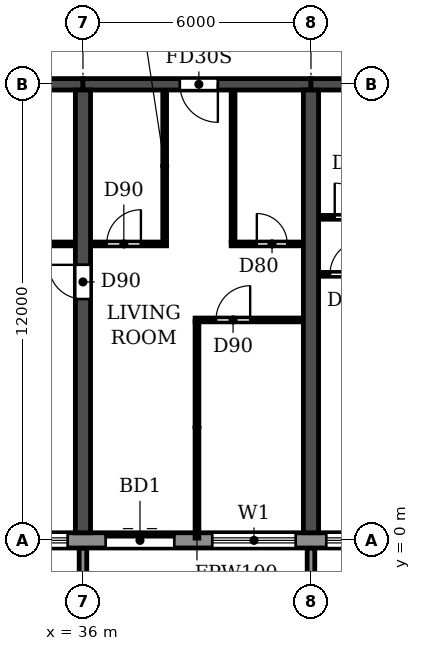
"""IFC4 building model, lengths in metres.
Left out: names, types, materials, properties, quantities, classifications, styles, units other than length and angle.
Written with IfcOpenShell. Run it as: python <this file> out.ifc"""

import sys

from ifc_helpers import new_model, si_unit, direction, frame, frame_2d, origin, place, context, subcontext, project, spatial, polyline, rectangle, outline, extrude, source, transform, mapped, element, fill, save


model = new_model("IFC4")
c1 = context("Model", 3, precision=1e-05, world=origin(), true_north=direction((0.0, 1.0)))
c2 = subcontext(c1, "Body", "Model", "MODEL_VIEW")
j1 = project(units=[si_unit("LENGTHUNIT", "METRE"), si_unit("PLANEANGLEUNIT", "RADIAN")], contexts=[c1])
p1 = place(None, origin())
s1 = spatial("IfcSite", under=j1, at=p1, CompositionType="ELEMENT")
p2 = place(p1, origin())
s2 = spatial("IfcBuilding", under=s1, at=p2, CompositionType="ELEMENT")
p3 = place(p2, frame((0.0, 0.0, 63.0)))
s3 = spatial("IfcBuildingStorey", under=s2, at=p3, CompositionType="ELEMENT", Elevation=63.0)
p4 = place(p3, frame((36.0, 0.2, 0.0), z_axis=(0.0, 0.0, 1.0), x_axis=(0.0, 1.0, 0.0)))
e1 = element("IfcWall", 1, at=p4, inside=s3, PredefinedType="SHEAR", context=c2, shape_type="SweptSolid", body=[
    extrude(rectangle(XDim=11.65, YDim=0.4, at=frame_2d((5.825, 0.0))), origin(), (0.0, 0.0, 1.0), 2.95),
])
p5 = place(p4, frame((6.15, 0.0, 0.0)))
e2 = element("IfcOpeningElement", 2, at=p5, cuts=e1, PredefinedType="OPENING", context=c2, shape_type="SweptSolid", body=[
    extrude(rectangle(XDim=0.9, YDim=2.1, at=frame_2d((0.45, 1.05))), frame((0.0, 0.21, 0.0), z_axis=(0.0, -1.0, 0.0), x_axis=(1.0, 0.0, 0.0)), (0.0, 0.0, 1.0), 0.42),
])
p6 = place(p3, frame((42.0, 0.2, 0.0), z_axis=(0.0, 0.0, 1.0), x_axis=(0.0, 1.0, 0.0)))
e3 = element("IfcWall", 3, at=p6, inside=s3, PredefinedType="SHEAR", context=c2, shape_type="SweptSolid", body=[
    extrude(rectangle(XDim=11.65, YDim=0.4, at=frame_2d((5.825, 0.0))), origin(), (0.0, 0.0, 1.0), 2.95),
])
p7 = place(p3, frame((30.0, 12.0, 0.0), z_axis=(0.0, 0.0, 1.0), x_axis=(1.0, 0.0, 0.0)))
e4 = element("IfcWall", 4, at=p7, inside=s3, PredefinedType="SHEAR", context=c2, shape_type="SweptSolid", body=[
    extrude(rectangle(XDim=6.0, YDim=0.3, at=frame_2d((3.0, 0.0))), origin(), (0.0, 0.0, 1.0), 2.35),
])
p8 = place(p3, frame((36.0, 12.0, 0.0), z_axis=(0.0, 0.0, 1.0), x_axis=(1.0, 0.0, 0.0)))
e5 = element("IfcWall", 5, at=p8, inside=s3, PredefinedType="SHEAR", context=c2, shape_type="SweptSolid", body=[
    extrude(rectangle(XDim=6.0, YDim=0.3, at=frame_2d((3.0, 0.0))), origin(), (0.0, 0.0, 1.0), 2.35),
])
p9 = place(p8, frame((2.55, 0.0, 0.0)))
e6 = element("IfcOpeningElement", 6, at=p9, cuts=e5, PredefinedType="OPENING", context=c2, shape_type="SweptSolid", body=[
    extrude(rectangle(XDim=1.0, YDim=2.1, at=frame_2d((0.5, 1.05))), frame((0.0, 0.16, 0.0), z_axis=(0.0, -1.0, 0.0), x_axis=(1.0, 0.0, 0.0)), (0.0, 0.0, 1.0), 0.32),
])
p10 = place(p3, frame((42.0, 12.0, 0.0), z_axis=(0.0, 0.0, 1.0), x_axis=(1.0, 0.0, 0.0)))
e7 = element("IfcWall", 7, at=p10, inside=s3, PredefinedType="SHEAR", context=c2, shape_type="SweptSolid", body=[
    extrude(rectangle(XDim=6.0, YDim=0.3, at=frame_2d((3.0, 0.0))), origin(), (0.0, 0.0, 1.0), 2.35),
])
p11 = place(p10, frame((2.55, 0.0, 0.0)))
e8 = element("IfcOpeningElement", 8, at=p11, cuts=e7, PredefinedType="OPENING", context=c2, shape_type="SweptSolid", body=[
    extrude(rectangle(XDim=1.0, YDim=2.1, at=frame_2d((0.5, 1.05))), frame((0.0, 0.16, 0.0), z_axis=(0.0, -1.0, 0.0), x_axis=(1.0, 0.0, 0.0)), (0.0, 0.0, 1.0), 0.32),
])
p12 = place(p3, frame((10.683, 0.0, 0.0), z_axis=(0.0, 0.0, 1.0), x_axis=(1.0, 0.0, 0.0)))
e9 = element("IfcWall", 9, at=p12, inside=s3, PredefinedType="STANDARD", context=c2, shape_type="SweptSolid", body=[
    extrude(rectangle(XDim=80.634, YDim=0.4, at=frame_2d((40.317, 0.0))), origin(), (0.0, 0.0, 1.0), 2.95),
])
p13 = place(p12, frame((1.717, 0.0, 0.9)))
e10 = element("IfcOpeningElement", 10, at=p13, cuts=e9, PredefinedType="OPENING", context=c2, shape_type="SweptSolid", body=[
    extrude(rectangle(XDim=2.2, YDim=1.5, at=frame_2d((1.1, 0.75))), frame((0.0, 0.21, 0.0), z_axis=(0.0, -1.0, 0.0), x_axis=(1.0, 0.0, 0.0)), (0.0, 0.0, 1.0), 0.42),
])
p14 = place(p12, frame((4.917, 0.0, 0.0)))
e11 = element("IfcOpeningElement", 11, at=p14, cuts=e9, PredefinedType="OPENING", context=c2, shape_type="SweptSolid", body=[
    extrude(rectangle(XDim=1.8, YDim=2.4, at=frame_2d((0.9, 1.2))), frame((0.0, 0.21, 0.0), z_axis=(0.0, -1.0, 0.0), x_axis=(1.0, 0.0, 0.0)), (0.0, 0.0, 1.0), 0.42),
])
p15 = place(p12, frame((7.717, 0.0, 0.9)))
e12 = element("IfcOpeningElement", 12, at=p15, cuts=e9, PredefinedType="OPENING", context=c2, shape_type="SweptSolid", body=[
    extrude(rectangle(XDim=2.2, YDim=1.5, at=frame_2d((1.1, 0.75))), frame((0.0, 0.21, 0.0), z_axis=(0.0, -1.0, 0.0), x_axis=(1.0, 0.0, 0.0)), (0.0, 0.0, 1.0), 0.42),
])
p16 = place(p12, frame((10.717, 0.0, 0.9)))
e13 = element("IfcOpeningElement", 13, at=p16, cuts=e9, PredefinedType="OPENING", context=c2, shape_type="SweptSolid", body=[
    extrude(rectangle(XDim=2.2, YDim=1.5, at=frame_2d((1.1, 0.75))), frame((0.0, 0.21, 0.0), z_axis=(0.0, -1.0, 0.0), x_axis=(1.0, 0.0, 0.0)), (0.0, 0.0, 1.0), 0.42),
])
p17 = place(p12, frame((13.717, 0.0, 0.9)))
e14 = element("IfcOpeningElement", 14, at=p17, cuts=e9, PredefinedType="OPENING", context=c2, shape_type="SweptSolid", body=[
    extrude(rectangle(XDim=2.2, YDim=1.5, at=frame_2d((1.1, 0.75))), frame((0.0, 0.21, 0.0), z_axis=(0.0, -1.0, 0.0), x_axis=(1.0, 0.0, 0.0)), (0.0, 0.0, 1.0), 0.42),
])
p18 = place(p12, frame((16.917, 0.0, 0.0)))
e15 = element("IfcOpeningElement", 15, at=p18, cuts=e9, PredefinedType="OPENING", context=c2, shape_type="SweptSolid", body=[
    extrude(rectangle(XDim=1.8, YDim=2.4, at=frame_2d((0.9, 1.2))), frame((0.0, 0.21, 0.0), z_axis=(0.0, -1.0, 0.0), x_axis=(1.0, 0.0, 0.0)), (0.0, 0.0, 1.0), 0.42),
])
p19 = place(p12, frame((19.717, 0.0, 0.9)))
e16 = element("IfcOpeningElement", 16, at=p19, cuts=e9, PredefinedType="OPENING", context=c2, shape_type="SweptSolid", body=[
    extrude(rectangle(XDim=2.2, YDim=1.5, at=frame_2d((1.1, 0.75))), frame((0.0, 0.21, 0.0), z_axis=(0.0, -1.0, 0.0), x_axis=(1.0, 0.0, 0.0)), (0.0, 0.0, 1.0), 0.42),
])
p20 = place(p12, frame((22.717, 0.0, 0.9)))
e17 = element("IfcOpeningElement", 17, at=p20, cuts=e9, PredefinedType="OPENING", context=c2, shape_type="SweptSolid", body=[
    extrude(rectangle(XDim=2.2, YDim=1.5, at=frame_2d((1.1, 0.75))), frame((0.0, 0.21, 0.0), z_axis=(0.0, -1.0, 0.0), x_axis=(1.0, 0.0, 0.0)), (0.0, 0.0, 1.0), 0.42),
])
p21 = place(p12, frame((25.917, 0.0, 0.0)))
e18 = element("IfcOpeningElement", 18, at=p21, cuts=e9, PredefinedType="OPENING", context=c2, shape_type="SweptSolid", body=[
    extrude(rectangle(XDim=1.8, YDim=2.4, at=frame_2d((0.9, 1.2))), frame((0.0, 0.21, 0.0), z_axis=(0.0, -1.0, 0.0), x_axis=(1.0, 0.0, 0.0)), (0.0, 0.0, 1.0), 0.42),
])
p22 = place(p12, frame((28.717, 0.0, 0.9)))
e19 = element("IfcOpeningElement", 19, at=p22, cuts=e9, PredefinedType="OPENING", context=c2, shape_type="SweptSolid", body=[
    extrude(rectangle(XDim=2.2, YDim=1.5, at=frame_2d((1.1, 0.75))), frame((0.0, 0.21, 0.0), z_axis=(0.0, -1.0, 0.0), x_axis=(1.0, 0.0, 0.0)), (0.0, 0.0, 1.0), 0.42),
])
p23 = place(p12, frame((31.717, 0.0, 0.9)))
e20 = element("IfcOpeningElement", 20, at=p23, cuts=e9, PredefinedType="OPENING", context=c2, shape_type="SweptSolid", body=[
    extrude(rectangle(XDim=2.2, YDim=1.5, at=frame_2d((1.1, 0.75))), frame((0.0, 0.21, 0.0), z_axis=(0.0, -1.0, 0.0), x_axis=(1.0, 0.0, 0.0)), (0.0, 0.0, 1.0), 0.42),
])
p24 = place(p12, frame((34.717, 0.0, 0.9)))
e21 = element("IfcOpeningElement", 21, at=p24, cuts=e9, PredefinedType="OPENING", context=c2, shape_type="SweptSolid", body=[
    extrude(rectangle(XDim=2.2, YDim=1.5, at=frame_2d((1.1, 0.75))), frame((0.0, 0.21, 0.0), z_axis=(0.0, -1.0, 0.0), x_axis=(1.0, 0.0, 0.0)), (0.0, 0.0, 1.0), 0.42),
])
p25 = place(p12, frame((37.717, 0.0, 0.9)))
e22 = element("IfcOpeningElement", 22, at=p25, cuts=e9, PredefinedType="OPENING", context=c2, shape_type="SweptSolid", body=[
    extrude(rectangle(XDim=2.2, YDim=1.5, at=frame_2d((1.1, 0.75))), frame((0.0, 0.21, 0.0), z_axis=(0.0, -1.0, 0.0), x_axis=(1.0, 0.0, 0.0)), (0.0, 0.0, 1.0), 0.42),
])
p26 = place(p12, frame((40.917, 0.0, 0.0)))
e23 = element("IfcOpeningElement", 23, at=p26, cuts=e9, PredefinedType="OPENING", context=c2, shape_type="SweptSolid", body=[
    extrude(rectangle(XDim=1.8, YDim=2.4, at=frame_2d((0.9, 1.2))), frame((0.0, 0.21, 0.0), z_axis=(0.0, -1.0, 0.0), x_axis=(1.0, 0.0, 0.0)), (0.0, 0.0, 1.0), 0.42),
])
p27 = place(p12, frame((43.717, 0.0, 0.9)))
e24 = element("IfcOpeningElement", 24, at=p27, cuts=e9, PredefinedType="OPENING", context=c2, shape_type="SweptSolid", body=[
    extrude(rectangle(XDim=2.2, YDim=1.5, at=frame_2d((1.1, 0.75))), frame((0.0, 0.21, 0.0), z_axis=(0.0, -1.0, 0.0), x_axis=(1.0, 0.0, 0.0)), (0.0, 0.0, 1.0), 0.42),
])
p28 = place(p12, frame((46.717, 0.0, 0.9)))
e25 = element("IfcOpeningElement", 25, at=p28, cuts=e9, PredefinedType="OPENING", context=c2, shape_type="SweptSolid", body=[
    extrude(rectangle(XDim=2.2, YDim=1.5, at=frame_2d((1.1, 0.75))), frame((0.0, 0.21, 0.0), z_axis=(0.0, -1.0, 0.0), x_axis=(1.0, 0.0, 0.0)), (0.0, 0.0, 1.0), 0.42),
])
p29 = place(p12, frame((49.717, 0.0, 0.9)))
e26 = element("IfcOpeningElement", 26, at=p29, cuts=e9, PredefinedType="OPENING", context=c2, shape_type="SweptSolid", body=[
    extrude(rectangle(XDim=2.2, YDim=1.5, at=frame_2d((1.1, 0.75))), frame((0.0, 0.21, 0.0), z_axis=(0.0, -1.0, 0.0), x_axis=(1.0, 0.0, 0.0)), (0.0, 0.0, 1.0), 0.42),
])
p30 = place(p12, frame((52.717, 0.0, 0.9)))
e27 = element("IfcOpeningElement", 27, at=p30, cuts=e9, PredefinedType="OPENING", context=c2, shape_type="SweptSolid", body=[
    extrude(rectangle(XDim=2.2, YDim=1.5, at=frame_2d((1.1, 0.75))), frame((0.0, 0.21, 0.0), z_axis=(0.0, -1.0, 0.0), x_axis=(1.0, 0.0, 0.0)), (0.0, 0.0, 1.0), 0.42),
])
p31 = place(p12, frame((55.717, 0.0, 0.9)))
e28 = element("IfcOpeningElement", 28, at=p31, cuts=e9, PredefinedType="OPENING", context=c2, shape_type="SweptSolid", body=[
    extrude(rectangle(XDim=2.2, YDim=1.5, at=frame_2d((1.1, 0.75))), frame((0.0, 0.21, 0.0), z_axis=(0.0, -1.0, 0.0), x_axis=(1.0, 0.0, 0.0)), (0.0, 0.0, 1.0), 0.42),
])
p32 = place(p12, frame((58.717, 0.0, 0.9)))
e29 = element("IfcOpeningElement", 29, at=p32, cuts=e9, PredefinedType="OPENING", context=c2, shape_type="SweptSolid", body=[
    extrude(rectangle(XDim=2.2, YDim=1.5, at=frame_2d((1.1, 0.75))), frame((0.0, 0.21, 0.0), z_axis=(0.0, -1.0, 0.0), x_axis=(1.0, 0.0, 0.0)), (0.0, 0.0, 1.0), 0.42),
])
p33 = place(p12, frame((61.717, 0.0, 0.9)))
e30 = element("IfcOpeningElement", 30, at=p33, cuts=e9, PredefinedType="OPENING", context=c2, shape_type="SweptSolid", body=[
    extrude(rectangle(XDim=2.2, YDim=1.5, at=frame_2d((1.1, 0.75))), frame((0.0, 0.21, 0.0), z_axis=(0.0, -1.0, 0.0), x_axis=(1.0, 0.0, 0.0)), (0.0, 0.0, 1.0), 0.42),
])
p34 = place(p12, frame((64.917, 0.0, 0.0)))
e31 = element("IfcOpeningElement", 31, at=p34, cuts=e9, PredefinedType="OPENING", context=c2, shape_type="SweptSolid", body=[
    extrude(rectangle(XDim=1.8, YDim=2.4, at=frame_2d((0.9, 1.2))), frame((0.0, 0.21, 0.0), z_axis=(0.0, -1.0, 0.0), x_axis=(1.0, 0.0, 0.0)), (0.0, 0.0, 1.0), 0.42),
])
p35 = place(p12, frame((67.717, 0.0, 0.9)))
e32 = element("IfcOpeningElement", 32, at=p35, cuts=e9, PredefinedType="OPENING", context=c2, shape_type="SweptSolid", body=[
    extrude(rectangle(XDim=2.2, YDim=1.5, at=frame_2d((1.1, 0.75))), frame((0.0, 0.21, 0.0), z_axis=(0.0, -1.0, 0.0), x_axis=(1.0, 0.0, 0.0)), (0.0, 0.0, 1.0), 0.42),
])
p36 = place(p12, frame((70.717, 0.0, 0.9)))
e33 = element("IfcOpeningElement", 33, at=p36, cuts=e9, PredefinedType="OPENING", context=c2, shape_type="SweptSolid", body=[
    extrude(rectangle(XDim=2.2, YDim=1.5, at=frame_2d((1.1, 0.75))), frame((0.0, 0.21, 0.0), z_axis=(0.0, -1.0, 0.0), x_axis=(1.0, 0.0, 0.0)), (0.0, 0.0, 1.0), 0.42),
])
p37 = place(p12, frame((73.717, 0.0, 0.9)))
e34 = element("IfcOpeningElement", 34, at=p37, cuts=e9, PredefinedType="OPENING", context=c2, shape_type="SweptSolid", body=[
    extrude(rectangle(XDim=2.2, YDim=1.5, at=frame_2d((1.1, 0.75))), frame((0.0, 0.21, 0.0), z_axis=(0.0, -1.0, 0.0), x_axis=(1.0, 0.0, 0.0)), (0.0, 0.0, 1.0), 0.42),
])
p38 = place(p12, frame((76.917, 0.0, 0.0)))
e35 = element("IfcOpeningElement", 35, at=p38, cuts=e9, PredefinedType="OPENING", context=c2, shape_type="SweptSolid", body=[
    extrude(rectangle(XDim=1.8, YDim=2.4, at=frame_2d((0.9, 1.2))), frame((0.0, 0.21, 0.0), z_axis=(0.0, -1.0, 0.0), x_axis=(1.0, 0.0, 0.0)), (0.0, 0.0, 1.0), 0.42),
])
m1 = source(origin(), c2, "Body", "SweptSolid", [
    extrude(outline(polyline([(0.0, 0.0), (0.2, 0.0), (0.2, 1.65), (0.0, 1.65), (0.0, 0.0)])), origin(), (0.0, 0.0, 1.0), 3.1),
])
for number, where in (
    (36, (35.9, -1.85, 0.0)),
    (37, (41.9, -1.85, 0.0)),
):
    element("IfcWall", number, at=place(p3, frame(where)), inside=s3, PredefinedType="STANDARD", context=c2, shape_type="MappedRepresentation", body=[
        mapped(m1, transform((0.0, 0.0, 0.0))),
    ])
p39 = place(p3, frame((38.95, 5.8, 0.0), z_axis=(0.0, 0.0, 1.0), x_axis=(1.0, 0.0, 0.0)))
e38 = element("IfcWall", 38, at=p39, inside=s3, PredefinedType="PARTITIONING", context=c2, shape_type="SweptSolid", body=[
    extrude(rectangle(XDim=2.84, YDim=0.1, at=frame_2d((1.42, 0.0))), origin(), (0.0, 0.0, 1.0), 2.95),
])
p40 = place(p39, frame((0.55, 0.0, 0.0)))
e39 = element("IfcOpeningElement", 39, at=p40, cuts=e38, PredefinedType="OPENING", context=c2, shape_type="SweptSolid", body=[
    extrude(rectangle(XDim=0.9, YDim=2.1, at=frame_2d((0.45, 1.05))), frame((0.0, 0.06, 0.0), z_axis=(0.0, -1.0, 0.0), x_axis=(1.0, 0.0, 0.0)), (0.0, 0.0, 1.0), 0.12),
])
p41 = place(p3, frame((42.21, 7.0, 0.0), z_axis=(0.0, 0.0, 1.0), x_axis=(1.0, 0.0, 0.0)))
e40 = element("IfcWall", 40, at=p41, inside=s3, PredefinedType="PARTITIONING", context=c2, shape_type="SweptSolid", body=[
    extrude(rectangle(XDim=2.84, YDim=0.1, at=frame_2d((1.42, 0.0))), origin(), (0.0, 0.0, 1.0), 2.95),
])
p42 = place(p41, frame((0.29, 0.0, 0.0)))
e41 = element("IfcOpeningElement", 41, at=p42, cuts=e40, PredefinedType="OPENING", context=c2, shape_type="SweptSolid", body=[
    extrude(rectangle(XDim=0.9, YDim=2.1, at=frame_2d((0.45, 1.05))), frame((0.0, 0.06, 0.0), z_axis=(0.0, -1.0, 0.0), x_axis=(1.0, 0.0, 0.0)), (0.0, 0.0, 1.0), 0.12),
])
p43 = place(p3, frame((33.1, 7.8, 0.0), z_axis=(0.0, 0.0, 1.0), x_axis=(1.0, 0.0, 0.0)))
e42 = element("IfcWall", 42, at=p43, inside=s3, PredefinedType="PARTITIONING", context=c2, shape_type="SweptSolid", body=[
    extrude(rectangle(XDim=2.69, YDim=0.1, at=frame_2d((1.345, 0.0))), origin(), (0.0, 0.0, 1.0), 2.95),
])
p44 = place(p43, frame((1.0, 0.0, 0.0)))
e43 = element("IfcOpeningElement", 43, at=p44, cuts=e42, PredefinedType="OPENING", context=c2, shape_type="SweptSolid", body=[
    extrude(rectangle(XDim=0.8, YDim=2.1, at=frame_2d((0.4, 1.05))), frame((0.0, 0.06, 0.0), z_axis=(0.0, -1.0, 0.0), x_axis=(1.0, 0.0, 0.0)), (0.0, 0.0, 1.0), 0.12),
])
p45 = place(p3, frame((36.21, 7.8, 0.0), z_axis=(0.0, 0.0, 1.0), x_axis=(1.0, 0.0, 0.0)))
e44 = element("IfcWall", 44, at=p45, inside=s3, PredefinedType="PARTITIONING", context=c2, shape_type="SweptSolid", body=[
    extrude(rectangle(XDim=1.99, YDim=0.1, at=frame_2d((0.995, 0.0))), origin(), (0.0, 0.0, 1.0), 2.95),
])
p46 = place(p45, frame((0.415, 0.0, 0.0)))
e45 = element("IfcOpeningElement", 45, at=p46, cuts=e44, PredefinedType="OPENING", context=c2, shape_type="SweptSolid", body=[
    extrude(rectangle(XDim=0.9, YDim=2.1, at=frame_2d((0.45, 1.05))), frame((0.0, 0.06, 0.0), z_axis=(0.0, -1.0, 0.0), x_axis=(1.0, 0.0, 0.0)), (0.0, 0.0, 1.0), 0.12),
])
p47 = place(p3, frame((39.9, 7.8, 0.0), z_axis=(0.0, 0.0, 1.0), x_axis=(1.0, 0.0, 0.0)))
e46 = element("IfcWall", 46, at=p47, inside=s3, PredefinedType="PARTITIONING", context=c2, shape_type="SweptSolid", body=[
    extrude(rectangle(XDim=1.89, YDim=0.1, at=frame_2d((0.945, 0.0))), origin(), (0.0, 0.0, 1.0), 2.95),
])
p48 = place(p47, frame((0.675, 0.0, 0.0)))
e47 = element("IfcOpeningElement", 47, at=p48, cuts=e46, PredefinedType="OPENING", context=c2, shape_type="SweptSolid", body=[
    extrude(rectangle(XDim=0.8, YDim=2.1, at=frame_2d((0.4, 1.05))), frame((0.0, 0.06, 0.0), z_axis=(0.0, -1.0, 0.0), x_axis=(1.0, 0.0, 0.0)), (0.0, 0.0, 1.0), 0.12),
])
p49 = place(p3, frame((42.21, 8.5, 0.0), z_axis=(0.0, 0.0, 1.0), x_axis=(1.0, 0.0, 0.0)))
e48 = element("IfcWall", 48, at=p49, inside=s3, PredefinedType="PARTITIONING", context=c2, shape_type="SweptSolid", body=[
    extrude(rectangle(XDim=1.99, YDim=0.1, at=frame_2d((0.995, 0.0))), origin(), (0.0, 0.0, 1.0), 2.95),
])
p50 = place(p49, frame((0.415, 0.0, 0.0)))
e49 = element("IfcOpeningElement", 49, at=p50, cuts=e48, PredefinedType="OPENING", context=c2, shape_type="SweptSolid", body=[
    extrude(rectangle(XDim=0.9, YDim=2.1, at=frame_2d((0.45, 1.05))), frame((0.0, 0.06, 0.0), z_axis=(0.0, -1.0, 0.0), x_axis=(1.0, 0.0, 0.0)), (0.0, 0.0, 1.0), 0.12),
])
p51 = place(p3, frame((38.15, 7.85, 0.0), z_axis=(0.0, 0.0, 1.0), x_axis=(0.0, 1.0, 0.0)))
e50 = element("IfcWall", 50, at=p51, inside=s3, PredefinedType="PARTITIONING", context=c2, shape_type="SweptSolid", body=[
    extrude(rectangle(XDim=3.99, YDim=0.1, at=frame_2d((1.995, 0.0))), origin(), (0.0, 0.0, 1.0), 2.95),
])
p52 = place(p3, frame((39.0, 0.06, 0.0), z_axis=(0.0, 0.0, 1.0), x_axis=(0.0, 1.0, 0.0)))
e51 = element("IfcWall", 51, at=p52, inside=s3, PredefinedType="PARTITIONING", context=c2, shape_type="SweptSolid", body=[
    extrude(rectangle(XDim=5.69, YDim=0.1, at=frame_2d((2.845, 0.0))), origin(), (0.0, 0.0, 1.0), 2.95),
])
p53 = place(p3, frame((39.95, 7.85, 0.0), z_axis=(0.0, 0.0, 1.0), x_axis=(0.0, 1.0, 0.0)))
e52 = element("IfcWall", 52, at=p53, inside=s3, PredefinedType="PARTITIONING", context=c2, shape_type="SweptSolid", body=[
    extrude(rectangle(XDim=3.99, YDim=0.1, at=frame_2d((1.995, 0.0))), origin(), (0.0, 0.0, 1.0), 2.95),
])
p54 = place(p20, origin())
e53 = element("IfcWindow", 53, at=p54, inside=s3, PartitioningType="DOUBLE_PANEL_HORIZONTAL", PredefinedType="WINDOW", context=c2, shape_type="SweptSolid", body=[
    extrude(rectangle(XDim=2.2, YDim=1.5, at=frame_2d((1.1, 0.75))), frame((0.0, 0.03, 0.0), z_axis=(0.0, -1.0, 0.0), x_axis=(1.0, 0.0, 0.0)), (0.0, 0.0, 1.0), 0.06),
])
fill(e17, e53)
p55 = place(p21, origin())
e54 = element("IfcDoor", 54, at=p55, inside=s3, OperationType="DOUBLE_DOOR_SLIDING", PredefinedType="DOOR", context=c2, shape_type="SweptSolid", body=[
    extrude(rectangle(XDim=1.8, YDim=2.4, at=frame_2d((0.9, 1.2))), frame((0.0, 0.025, 0.0), z_axis=(0.0, -1.0, 0.0), x_axis=(1.0, 0.0, 0.0)), (0.0, 0.0, 1.0), 0.05),
])
fill(e18, e54)
p56 = place(p22, origin())
e55 = element("IfcWindow", 55, at=p56, inside=s3, PartitioningType="DOUBLE_PANEL_HORIZONTAL", PredefinedType="WINDOW", context=c2, shape_type="SweptSolid", body=[
    extrude(rectangle(XDim=2.2, YDim=1.5, at=frame_2d((1.1, 0.75))), frame((0.0, 0.03, 0.0), z_axis=(0.0, -1.0, 0.0), x_axis=(1.0, 0.0, 0.0)), (0.0, 0.0, 1.0), 0.06),
])
fill(e19, e55)
p57 = place(p23, origin())
e56 = element("IfcWindow", 56, at=p57, inside=s3, PartitioningType="DOUBLE_PANEL_HORIZONTAL", PredefinedType="WINDOW", context=c2, shape_type="SweptSolid", body=[
    extrude(rectangle(XDim=2.2, YDim=1.5, at=frame_2d((1.1, 0.75))), frame((0.0, 0.03, 0.0), z_axis=(0.0, -1.0, 0.0), x_axis=(1.0, 0.0, 0.0)), (0.0, 0.0, 1.0), 0.06),
])
fill(e20, e56)
p58 = place(p5, origin())
e57 = element("IfcDoor", 57, at=p58, inside=s3, OperationType="SINGLE_SWING_RIGHT", PredefinedType="DOOR", context=c2, shape_type="SweptSolid", body=[
    extrude(rectangle(XDim=0.9, YDim=2.1, at=frame_2d((0.45, 1.05))), frame((0.0, 0.025, 0.0), z_axis=(0.0, -1.0, 0.0), x_axis=(1.0, 0.0, 0.0)), (0.0, 0.0, 1.0), 0.05),
])
fill(e2, e57)
p59 = place(p46, origin())
e58 = element("IfcDoor", 58, at=p59, inside=s3, OperationType="SINGLE_SWING_RIGHT", PredefinedType="DOOR", context=c2, shape_type="SweptSolid", body=[
    extrude(rectangle(XDim=0.9, YDim=2.1, at=frame_2d((0.45, 1.05))), frame((0.0, 0.025, 0.0), z_axis=(0.0, -1.0, 0.0), x_axis=(1.0, 0.0, 0.0)), (0.0, 0.0, 1.0), 0.05),
])
fill(e45, e58)
p60 = place(p9, frame((1.0, 0.0, 0.0), z_axis=(0.0, 0.0, 1.0), x_axis=(-1.0, 0.0, 0.0)))
e59 = element("IfcDoor", 59, at=p60, inside=s3, OperationType="SINGLE_SWING_LEFT", PredefinedType="DOOR", context=c2, shape_type="SweptSolid", body=[
    extrude(rectangle(XDim=1.0, YDim=2.1, at=frame_2d((0.5, 1.05))), frame((0.0, 0.025, 0.0), z_axis=(0.0, -1.0, 0.0), x_axis=(1.0, 0.0, 0.0)), (0.0, 0.0, 1.0), 0.05),
])
fill(e6, e59)
p61 = place(p40, origin())
e60 = element("IfcDoor", 60, at=p61, inside=s3, OperationType="SINGLE_SWING_RIGHT", PredefinedType="DOOR", context=c2, shape_type="SweptSolid", body=[
    extrude(rectangle(XDim=0.9, YDim=2.1, at=frame_2d((0.45, 1.05))), frame((0.0, 0.025, 0.0), z_axis=(0.0, -1.0, 0.0), x_axis=(1.0, 0.0, 0.0)), (0.0, 0.0, 1.0), 0.05),
])
fill(e39, e60)
p62 = place(p48, origin())
e61 = element("IfcDoor", 61, at=p62, inside=s3, OperationType="SINGLE_SWING_LEFT", PredefinedType="DOOR", context=c2, shape_type="SweptSolid", body=[
    extrude(rectangle(XDim=0.8, YDim=2.1, at=frame_2d((0.4, 1.05))), frame((0.0, 0.025, 0.0), z_axis=(0.0, -1.0, 0.0), x_axis=(1.0, 0.0, 0.0)), (0.0, 0.0, 1.0), 0.05),
])
fill(e47, e61)
p63 = place(p42, origin())
e62 = element("IfcDoor", 62, at=p63, inside=s3, OperationType="SINGLE_SWING_RIGHT", PredefinedType="DOOR", context=c2, shape_type="SweptSolid", body=[
    extrude(rectangle(XDim=0.9, YDim=2.1, at=frame_2d((0.45, 1.05))), frame((0.0, 0.025, 0.0), z_axis=(0.0, -1.0, 0.0), x_axis=(1.0, 0.0, 0.0)), (0.0, 0.0, 1.0), 0.05),
])
fill(e41, e62)
p64 = place(p50, origin())
e63 = element("IfcDoor", 63, at=p64, inside=s3, OperationType="SINGLE_SWING_LEFT", PredefinedType="DOOR", context=c2, shape_type="SweptSolid", body=[
    extrude(rectangle(XDim=0.9, YDim=2.1, at=frame_2d((0.45, 1.05))), frame((0.0, 0.025, 0.0), z_axis=(0.0, -1.0, 0.0), x_axis=(1.0, 0.0, 0.0)), (0.0, 0.0, 1.0), 0.05),
])
fill(e49, e63)
save(model, sys.argv[1])
